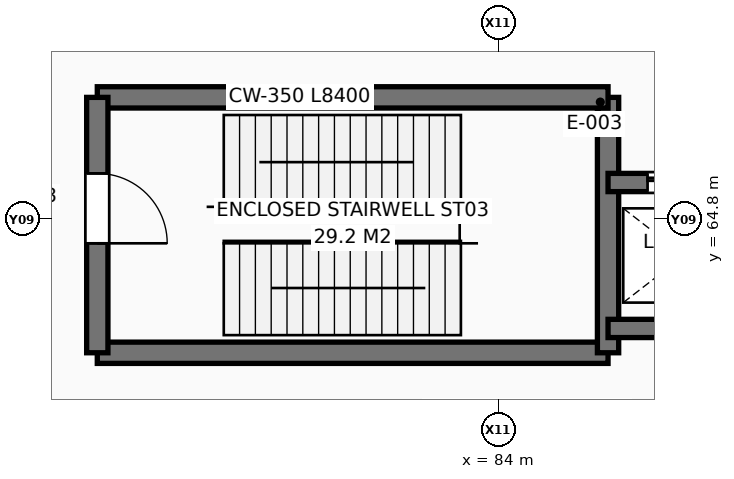
"""IFC4 building model, lengths in metres.
Left out: names, types, materials, properties, quantities, classifications, styles, units other than length and angle.
Written with IfcOpenShell. Run it as: python <this file> out.ifc"""

import sys

from ifc_helpers import new_model, si_unit, direction, frame, frame_2d, origin, place, context, subcontext, project, spatial, rectangle, extrude, element, fill, save


model = new_model("IFC4")
c1 = context("Model", 3, precision=1e-05, world=origin(), true_north=direction((0.0, 1.0)))
c2 = subcontext(c1, "Body", "Model", "MODEL_VIEW")
j1 = project(units=[si_unit("LENGTHUNIT", "METRE"), si_unit("PLANEANGLEUNIT", "RADIAN")], contexts=[c1])
p1 = place(None, origin())
s1 = spatial("IfcSite", under=j1, at=p1, CompositionType="ELEMENT")
p2 = place(p1, origin())
s2 = spatial("IfcBuilding", under=s1, at=p2, CompositionType="ELEMENT")
p3 = place(p2, origin())
s3 = spatial("IfcBuildingStorey", under=s2, at=p3, CompositionType="ELEMENT", Elevation=0.0)
p4 = place(p3, frame((79.19, 68.104, 0.0), z_axis=(0.0, 0.0, 1.0), x_axis=(0.999197941097, -0.040043407783, 0.0)))
e1 = element("IfcWall", 1, at=p4, inside=s3, PredefinedType="SOLIDWALL", context=c2, shape_type="SweptSolid", body=[
    extrude(rectangle(XDim=13.066, YDim=0.34, at=frame_2d((6.533, 0.0))), origin(), (0.0, 0.0, 1.0), 4.587),
])
p5 = place(p4, frame((5.533, 0.0, 0.0)))
e2 = element("IfcOpeningElement", 2, at=p5, cuts=e1, PredefinedType="OPENING", context=c2, shape_type="SweptSolid", body=[
    extrude(rectangle(XDim=2.0, YDim=2.5, at=frame_2d((1.0, 1.25))), frame((0.0, 0.18, 0.0), z_axis=(0.0, -1.0, 0.0), x_axis=(1.0, 0.0, 0.0)), (0.0, 0.0, 1.0), 0.36),
])
p6 = place(p3, frame((77.4, 62.6, 0.0), z_axis=(0.0, 0.0, 1.0), x_axis=(1.0, 0.0, 0.0)))
e3 = element("IfcWall", 3, at=p6, inside=s3, PredefinedType="SHEAR", context=c2, shape_type="SweptSolid", body=[
    extrude(rectangle(XDim=8.4, YDim=0.35, at=frame_2d((4.2, 0.0))), origin(), (0.0, 0.0, 1.0), 5.12),
])
p7 = place(p3, frame((85.8, 62.6, 0.0), z_axis=(0.0, 0.0, 1.0), x_axis=(0.0, 1.0, 0.0)))
e4 = element("IfcWall", 4, at=p7, inside=s3, PredefinedType="SHEAR", context=c2, shape_type="SweptSolid", body=[
    extrude(rectangle(XDim=4.2, YDim=0.35, at=frame_2d((2.1, 0.0))), origin(), (0.0, 0.0, 1.0), 5.12),
])
p8 = place(p3, frame((85.8, 66.8, 0.0), z_axis=(0.0, 0.0, 1.0), x_axis=(-1.0, 0.0, 0.0)))
e5 = element("IfcWall", 5, at=p8, inside=s3, PredefinedType="SHEAR", context=c2, shape_type="SweptSolid", body=[
    extrude(rectangle(XDim=8.4, YDim=0.35, at=frame_2d((4.2, 0.0))), origin(), (0.0, 0.0, 1.0), 5.12),
])
p9 = place(p3, frame((77.4, 66.8, 0.0), z_axis=(0.0, 0.0, 1.0), x_axis=(0.0, -1.0, 0.0)))
e6 = element("IfcWall", 6, at=p9, inside=s3, PredefinedType="SHEAR", context=c2, shape_type="SweptSolid", body=[
    extrude(rectangle(XDim=4.2, YDim=0.35, at=frame_2d((2.1, 0.0))), origin(), (0.0, 0.0, 1.0), 5.12),
])
p10 = place(p9, frame((1.25, 0.0, 0.0)))
e7 = element("IfcOpeningElement", 7, at=p10, cuts=e6, PredefinedType="OPENING", context=c2, shape_type="SweptSolid", body=[
    extrude(rectangle(XDim=1.15, YDim=2.2, at=frame_2d((0.575, 1.1))), frame((0.0, 0.185, 0.0), z_axis=(0.0, -1.0, 0.0), x_axis=(1.0, 0.0, 0.0)), (0.0, 0.0, 1.0), 0.37),
])
p11 = place(p3, frame((88.3, 65.4, 0.0), z_axis=(0.0, 0.0, 1.0), x_axis=(-1.0, 0.0, 0.0)))
e8 = element("IfcWall", 8, at=p11, inside=s3, PredefinedType="SHEAR", context=c2, shape_type="SweptSolid", body=[
    extrude(rectangle(XDim=2.5, YDim=0.3, at=frame_2d((1.25, 0.0))), origin(), (0.0, 0.0, 1.0), 5.12),
])
p12 = place(p11, frame((0.65, 0.0, 0.0)))
e9 = element("IfcOpeningElement", 9, at=p12, cuts=e8, PredefinedType="OPENING", context=c2, shape_type="SweptSolid", body=[
    extrude(rectangle(XDim=1.2, YDim=2.25, at=frame_2d((0.6, 1.125))), frame((0.0, 0.16, 0.0), z_axis=(0.0, -1.0, 0.0), x_axis=(1.0, 0.0, 0.0)), (0.0, 0.0, 1.0), 0.32),
])
p13 = place(p3, frame((85.8, 63.0, 0.0), z_axis=(0.0, 0.0, 1.0), x_axis=(1.0, 0.0, 0.0)))
e10 = element("IfcWall", 10, at=p13, inside=s3, PredefinedType="SHEAR", context=c2, shape_type="SweptSolid", body=[
    extrude(rectangle(XDim=2.5, YDim=0.3, at=frame_2d((1.25, 0.0))), origin(), (0.0, 0.0, 1.0), 5.12),
])
p14 = place(p10, frame((1.15, 0.0, 0.0), z_axis=(0.0, 0.0, 1.0), x_axis=(-1.0, 0.0, 0.0)))
e11 = element("IfcDoor", 11, at=p14, inside=s3, OperationType="SINGLE_SWING_RIGHT", PredefinedType="DOOR", context=c2, shape_type="SweptSolid", body=[
    extrude(rectangle(XDim=1.15, YDim=2.2, at=frame_2d((0.575, 1.1))), frame((0.0, 0.025, 0.0), z_axis=(0.0, -1.0, 0.0), x_axis=(1.0, 0.0, 0.0)), (0.0, 0.0, 1.0), 0.05),
])
fill(e7, e11)
p15 = place(p12, origin())
e12 = element("IfcDoor", 12, at=p15, inside=s3, OperationType="SLIDING_TO_LEFT", PredefinedType="DOOR", context=c2, shape_type="SweptSolid", body=[
    extrude(rectangle(XDim=1.2, YDim=2.25, at=frame_2d((0.6, 1.125))), frame((0.0, 0.025, 0.0), z_axis=(0.0, -1.0, 0.0), x_axis=(1.0, 0.0, 0.0)), (0.0, 0.0, 1.0), 0.05),
])
fill(e9, e12)
save(model, sys.argv[1])
